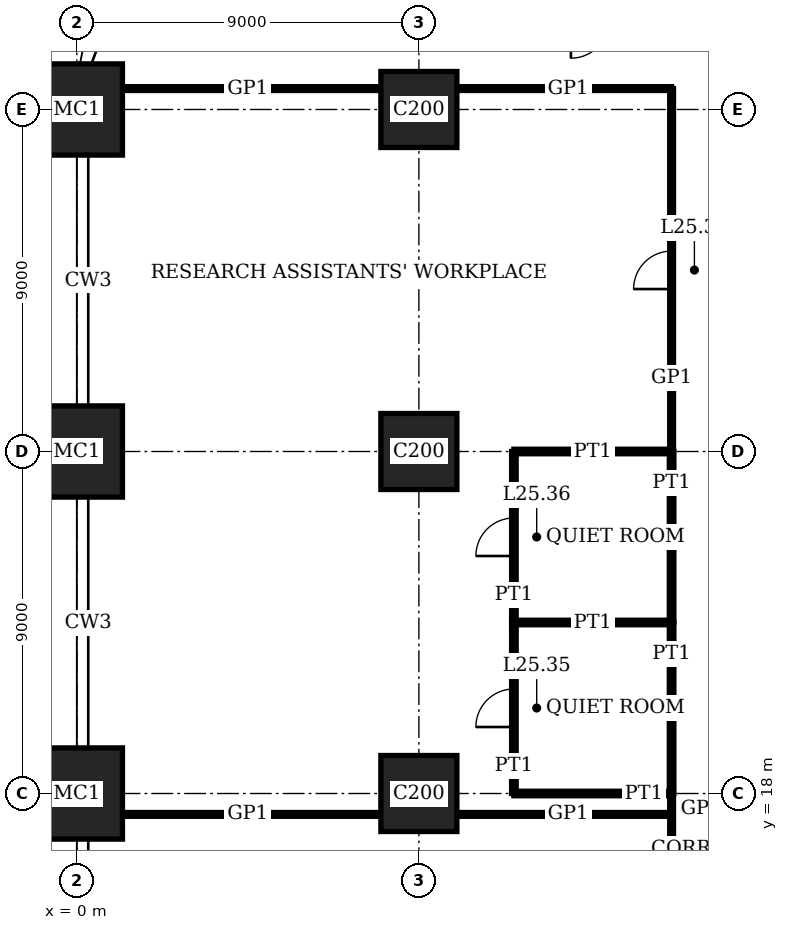
"""IFC4 building model, lengths in metres.
Left out: names, types, materials, properties, quantities, classifications, styles, units other than length and angle.
Written with IfcOpenShell. Run it as: python <this file> out.ifc"""

import sys

from ifc_helpers import new_model, si_unit, direction, frame, frame_2d, origin, origin_2d, place, context, subcontext, project, spatial, rectangle, extrude, element, fill, save


model = new_model("IFC4")
c1 = context("Model", 3, precision=1e-05, world=origin(), true_north=direction((0.0, 1.0)))
c2 = subcontext(c1, "Body", "Model", "MODEL_VIEW")
j1 = project(units=[si_unit("LENGTHUNIT", "METRE"), si_unit("PLANEANGLEUNIT", "RADIAN")], contexts=[c1])
p1 = place(None, origin())
s1 = spatial("IfcSite", under=j1, at=p1, CompositionType="ELEMENT")
p2 = place(p1, origin())
s2 = spatial("IfcBuilding", under=s1, at=p2, CompositionType="ELEMENT")
p3 = place(p2, frame((0.0, 0.0, 105.0)))
s3 = spatial("IfcBuildingStorey", under=s2, at=p3, CompositionType="ELEMENT", Elevation=105.0)
for number, where, z_axis, x_axis in (
    (1, (0.0, 18.0, 0.0), (0.0, 0.0, 1.0), (1.0, 0.0, 0.0)),
    (2, (0.0, 27.0, 0.0), (0.0, 0.0, 1.0), (1.0, 0.0, 0.0)),
    (3, (0.0, 36.0, 0.0), (0.0, 0.0, 1.0), (1.0, 0.0, 0.0)),
):
    element("IfcColumn", number, at=place(p3, frame(where, z_axis=z_axis, x_axis=x_axis)), inside=s3, PredefinedType="COLUMN", context=c2, shape_type="SweptSolid", body=[
        extrude(rectangle(XDim=2.4, YDim=2.4, at=origin_2d()), origin(), (0.0, 0.0, 1.0), 4.0),
    ])
for number, where, z_axis, x_axis in (
    (4, (9.0, 18.0, 0.0), (0.0, 0.0, 1.0), (1.0, 0.0, 0.0)),
    (5, (9.0, 27.0, 0.0), (0.0, 0.0, 1.0), (1.0, 0.0, 0.0)),
    (6, (9.0, 36.0, 0.0), (0.0, 0.0, 1.0), (1.0, 0.0, 0.0)),
):
    element("IfcColumn", number, at=place(p3, frame(where, z_axis=z_axis, x_axis=x_axis)), inside=s3, PredefinedType="COLUMN", context=c2, shape_type="SweptSolid", body=[
        extrude(rectangle(XDim=2.0, YDim=2.0, at=origin_2d()), origin(), (0.0, 0.0, 1.0), 4.0),
    ])
p4 = place(p3, frame((1.2, 17.45, 0.0), z_axis=(0.0, 0.0, 1.0), x_axis=(1.0, 0.0, 0.0)))
e7 = element("IfcWall", 7, at=p4, inside=s3, PredefinedType="PARTITIONING", context=c2, shape_type="SweptSolid", body=[
    extrude(rectangle(XDim=6.8, YDim=0.1, at=frame_2d((3.4, 0.0))), origin(), (0.0, 0.0, 1.0), 3.75),
])
p5 = place(p3, frame((10.0, 17.45, 0.0), z_axis=(0.0, 0.0, 1.0), x_axis=(1.0, 0.0, 0.0)))
e8 = element("IfcWall", 8, at=p5, inside=s3, PredefinedType="PARTITIONING", context=c2, shape_type="SweptSolid", body=[
    extrude(rectangle(XDim=5.65, YDim=0.1, at=frame_2d((2.825, 0.0))), origin(), (0.0, 0.0, 1.0), 3.75),
])
p6 = place(p3, frame((11.5, 18.0, 0.0), z_axis=(0.0, 0.0, 1.0), x_axis=(1.0, 0.0, 0.0)))
e9 = element("IfcWall", 9, at=p6, inside=s3, PredefinedType="PARTITIONING", context=c2, shape_type="SweptSolid", body=[
    extrude(rectangle(XDim=4.15, YDim=0.12, at=frame_2d((2.075, 0.0))), origin(), (0.0, 0.0, 1.0), 3.05),
])
p7 = place(p3, frame((11.5, 22.5, 0.0), z_axis=(0.0, 0.0, 1.0), x_axis=(1.0, 0.0, 0.0)))
e10 = element("IfcWall", 10, at=p7, inside=s3, PredefinedType="PARTITIONING", context=c2, shape_type="SweptSolid", body=[
    extrude(rectangle(XDim=4.15, YDim=0.12, at=frame_2d((2.075, 0.0))), origin(), (0.0, 0.0, 1.0), 3.1),
])
p8 = place(p3, frame((11.5, 27.0, 0.0), z_axis=(0.0, 0.0, 1.0), x_axis=(1.0, 0.0, 0.0)))
e11 = element("IfcWall", 11, at=p8, inside=s3, PredefinedType="PARTITIONING", context=c2, shape_type="SweptSolid", body=[
    extrude(rectangle(XDim=4.15, YDim=0.12, at=frame_2d((2.075, 0.0))), origin(), (0.0, 0.0, 1.0), 3.05),
])
p9 = place(p3, frame((1.2, 36.55, 0.0), z_axis=(0.0, 0.0, 1.0), x_axis=(1.0, 0.0, 0.0)))
e12 = element("IfcWall", 12, at=p9, inside=s3, PredefinedType="PARTITIONING", context=c2, shape_type="SweptSolid", body=[
    extrude(rectangle(XDim=6.8, YDim=0.1, at=frame_2d((3.4, 0.0))), origin(), (0.0, 0.0, 1.0), 3.75),
])
p10 = place(p3, frame((10.0, 36.55, 0.0), z_axis=(0.0, 0.0, 1.0), x_axis=(1.0, 0.0, 0.0)))
e13 = element("IfcWall", 13, at=p10, inside=s3, PredefinedType="PARTITIONING", context=c2, shape_type="SweptSolid", body=[
    extrude(rectangle(XDim=5.65, YDim=0.1, at=frame_2d((2.825, 0.0))), origin(), (0.0, 0.0, 1.0), 3.75),
])
p11 = place(p3, frame((11.5, 18.0, 0.0), z_axis=(0.0, 0.0, 1.0), x_axis=(0.0, 1.0, 0.0)))
e14 = element("IfcWall", 14, at=p11, inside=s3, PredefinedType="PARTITIONING", context=c2, shape_type="SweptSolid", body=[
    extrude(rectangle(XDim=4.5, YDim=0.12, at=frame_2d((2.25, 0.0))), origin(), (0.0, 0.0, 1.0), 3.75),
])
p12 = place(p11, frame((1.75, 0.0, 0.0)))
e15 = element("IfcOpeningElement", 15, at=p12, cuts=e14, PredefinedType="OPENING", context=c2, shape_type="SweptSolid", body=[
    extrude(rectangle(XDim=1.0, YDim=2.4, at=frame_2d((0.5, 1.2))), frame((0.0, 0.07, 0.0), z_axis=(0.0, -1.0, 0.0), x_axis=(1.0, 0.0, 0.0)), (0.0, 0.0, 1.0), 0.14),
])
p13 = place(p3, frame((11.5, 22.5, 0.0), z_axis=(0.0, 0.0, 1.0), x_axis=(0.0, 1.0, 0.0)))
e16 = element("IfcWall", 16, at=p13, inside=s3, PredefinedType="PARTITIONING", context=c2, shape_type="SweptSolid", body=[
    extrude(rectangle(XDim=4.5, YDim=0.12, at=frame_2d((2.25, 0.0))), origin(), (0.0, 0.0, 1.0), 3.75),
])
p14 = place(p13, frame((1.75, 0.0, 0.0)))
e17 = element("IfcOpeningElement", 17, at=p14, cuts=e16, PredefinedType="OPENING", context=c2, shape_type="SweptSolid", body=[
    extrude(rectangle(XDim=1.0, YDim=2.4, at=frame_2d((0.5, 1.2))), frame((0.0, 0.07, 0.0), z_axis=(0.0, -1.0, 0.0), x_axis=(1.0, 0.0, 0.0)), (0.0, 0.0, 1.0), 0.14),
])
for number, where, z_axis, x_axis in (
    (18, (15.65, 18.0, 0.0), (0.0, 0.0, 1.0), (0.0, 1.0, 0.0)),
    (19, (15.65, 22.5, 0.0), (0.0, 0.0, 1.0), (0.0, 1.0, 0.0)),
):
    element("IfcWall", number, at=place(p3, frame(where, z_axis=z_axis, x_axis=x_axis)), inside=s3, PredefinedType="PARTITIONING", context=c2, shape_type="SweptSolid", body=[
        extrude(rectangle(XDim=4.5, YDim=0.12, at=frame_2d((2.25, 0.0))), origin(), (0.0, 0.0, 1.0), 3.75),
    ])
p15 = place(p3, frame((15.65, 15.65, 0.0), z_axis=(0.0, 0.0, 1.0), x_axis=(0.0, 1.0, 0.0)))
e20 = element("IfcWall", 20, at=p15, inside=s3, PredefinedType="PARTITIONING", context=c2, shape_type="SweptSolid", body=[
    extrude(rectangle(XDim=2.35, YDim=0.1, at=frame_2d((1.175, 0.0))), origin(), (0.0, 0.0, 1.0), 3.75),
])
p16 = place(p3, frame((15.65, 27.0, 0.0), z_axis=(0.0, 0.0, 1.0), x_axis=(0.0, 1.0, 0.0)))
e21 = element("IfcWall", 21, at=p16, inside=s3, PredefinedType="PARTITIONING", context=c2, shape_type="SweptSolid", body=[
    extrude(rectangle(XDim=9.55, YDim=0.1, at=frame_2d((4.775, 0.0))), origin(), (0.0, 0.0, 1.0), 3.75),
])
p17 = place(p16, frame((4.275, 0.0, 0.0)))
e22 = element("IfcOpeningElement", 22, at=p17, cuts=e21, PredefinedType="OPENING", context=c2, shape_type="SweptSolid", body=[
    extrude(rectangle(XDim=1.0, YDim=2.4, at=frame_2d((0.5, 1.2))), frame((0.0, 0.06, 0.0), z_axis=(0.0, -1.0, 0.0), x_axis=(1.0, 0.0, 0.0)), (0.0, 0.0, 1.0), 0.12),
])
p18 = place(p12, origin())
e23 = element("IfcDoor", 23, at=p18, inside=s3, OperationType="SINGLE_SWING_RIGHT", PredefinedType="DOOR", context=c2, shape_type="SweptSolid", body=[
    extrude(rectangle(XDim=1.0, YDim=2.4, at=frame_2d((0.5, 1.2))), frame((0.0, 0.025, 0.0), z_axis=(0.0, -1.0, 0.0), x_axis=(1.0, 0.0, 0.0)), (0.0, 0.0, 1.0), 0.05),
])
fill(e15, e23)
p19 = place(p14, origin())
e24 = element("IfcDoor", 24, at=p19, inside=s3, OperationType="SINGLE_SWING_RIGHT", PredefinedType="DOOR", context=c2, shape_type="SweptSolid", body=[
    extrude(rectangle(XDim=1.0, YDim=2.4, at=frame_2d((0.5, 1.2))), frame((0.0, 0.025, 0.0), z_axis=(0.0, -1.0, 0.0), x_axis=(1.0, 0.0, 0.0)), (0.0, 0.0, 1.0), 0.05),
])
fill(e17, e24)
p20 = place(p17, origin())
e25 = element("IfcDoor", 25, at=p20, inside=s3, OperationType="SINGLE_SWING_RIGHT", PredefinedType="DOOR", context=c2, shape_type="SweptSolid", body=[
    extrude(rectangle(XDim=1.0, YDim=2.4, at=frame_2d((0.5, 1.2))), frame((0.0, 0.02, 0.0), z_axis=(0.0, -1.0, 0.0), x_axis=(1.0, 0.0, 0.0)), (0.0, 0.0, 1.0), 0.04),
])
fill(e22, e25)
save(model, sys.argv[1])
